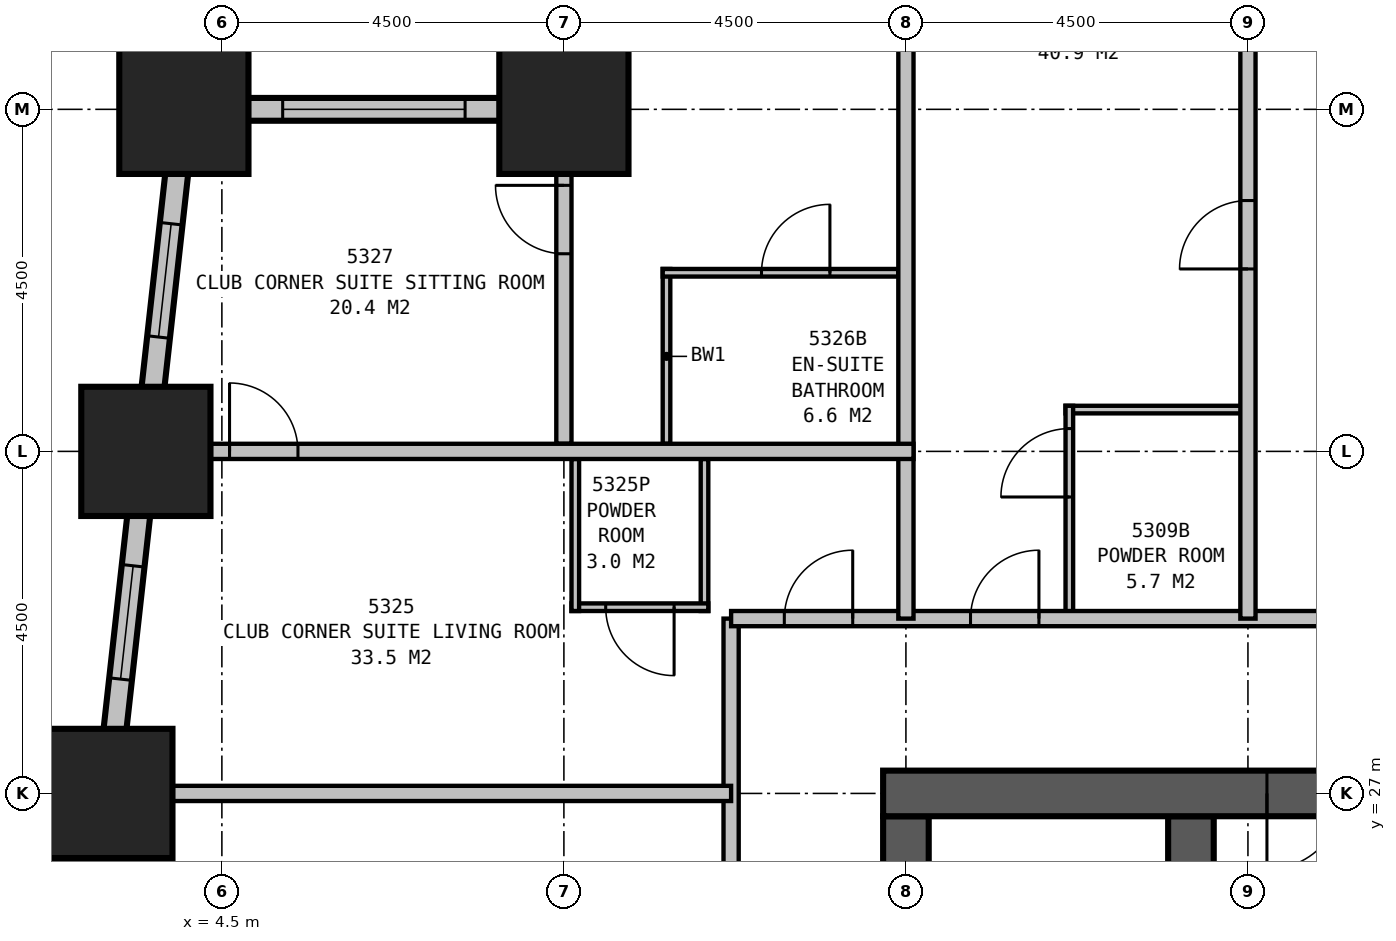
"""IFC4 building model, lengths in metres.
Left out: names, types, materials, properties, quantities, classifications, styles, units other than length and angle.
Written with IfcOpenShell. Run it as: python <this file> out.ifc"""

import sys

from ifc_helpers import new_model, si_unit, direction, frame, frame_2d, origin, origin_2d, place, context, subcontext, project, spatial, rectangle, extrude, element, fill, save


model = new_model("IFC4")
c1 = context("Model", 3, precision=1e-05, world=origin(), true_north=direction((0.0, 1.0)))
c2 = subcontext(c1, "Body", "Model", "MODEL_VIEW")
j1 = project(units=[si_unit("LENGTHUNIT", "METRE"), si_unit("PLANEANGLEUNIT", "RADIAN")], contexts=[c1])
p1 = place(None, origin())
s1 = spatial("IfcSite", under=j1, at=p1, CompositionType="ELEMENT")
p2 = place(p1, origin())
s2 = spatial("IfcBuilding", under=s1, at=p2, CompositionType="ELEMENT")
p3 = place(p2, frame((0.0, 0.0, 204.4)))
s3 = spatial("IfcBuildingStorey", under=s2, at=p3, CompositionType="ELEMENT", Elevation=204.4)
for number, where, z_axis, x_axis in (
    (1, (9.0, 36.0, 0.0), (0.0, 0.0, 1.0), (1.0, 0.0, 0.0)),
    (2, (4.0, 36.0, 0.0), (0.0, 0.0, 1.0), (1.0, 0.0, 0.0)),
    (3, (3.5, 31.5, 0.0), (0.0, 0.0, 1.0), (1.0, 0.0, 0.0)),
    (4, (3.0, 27.0, 0.0), (0.0, 0.0, 1.0), (1.0, 0.0, 0.0)),
):
    element("IfcColumn", number, at=place(p3, frame(where, z_axis=z_axis, x_axis=x_axis)), inside=s3, PredefinedType="COLUMN", context=c2, shape_type="SweptSolid", body=[
        extrude(rectangle(XDim=1.7, YDim=1.7, at=origin_2d()), origin(), (0.0, 0.0, 1.0), 3.5),
    ])
p4 = place(p3, frame((36.3, 27.0, 0.0), z_axis=(0.0, 0.0, 1.0), x_axis=(-1.0, 0.0, 0.0)))
e5 = element("IfcWall", 5, at=p4, inside=s3, PredefinedType="SHEAR", context=c2, shape_type="SweptSolid", body=[
    extrude(rectangle(XDim=23.1, YDim=0.6, at=frame_2d((11.55, 0.0))), origin(), (0.0, 0.0, 1.0), 3.5),
])
p5 = place(p4, frame((17.05, 0.0, 0.0)))
e6 = element("IfcOpeningElement", 6, at=p5, cuts=e5, PredefinedType="OPENING", context=c2, shape_type="SweptSolid", body=[
    extrude(rectangle(XDim=1.0, YDim=2.1, at=frame_2d((0.5, 1.05))), frame((0.0, 0.31, 0.0), z_axis=(0.0, -1.0, 0.0), x_axis=(1.0, 0.0, 0.0)), (0.0, 0.0, 1.0), 0.62),
])
p6 = place(p4, frame((12.05, 0.0, 0.0)))
e7 = element("IfcOpeningElement", 7, at=p6, cuts=e5, PredefinedType="OPENING", context=c2, shape_type="SweptSolid", body=[
    extrude(rectangle(XDim=1.0, YDim=2.1, at=frame_2d((0.5, 1.05))), frame((0.0, 0.31, 0.0), z_axis=(0.0, -1.0, 0.0), x_axis=(1.0, 0.0, 0.0)), (0.0, 0.0, 1.0), 0.62),
])
p7 = place(p4, frame((7.05, 0.0, 0.0)))
e8 = element("IfcOpeningElement", 8, at=p7, cuts=e5, PredefinedType="OPENING", context=c2, shape_type="SweptSolid", body=[
    extrude(rectangle(XDim=1.0, YDim=2.1, at=frame_2d((0.5, 1.05))), frame((0.0, 0.31, 0.0), z_axis=(0.0, -1.0, 0.0), x_axis=(1.0, 0.0, 0.0)), (0.0, 0.0, 1.0), 0.62),
])
p8 = place(p3, frame((17.25, 13.8, 0.0), z_axis=(0.0, 0.0, 1.0), x_axis=(0.0, 1.0, 0.0)))
e9 = element("IfcWall", 9, at=p8, inside=s3, PredefinedType="SHEAR", context=c2, shape_type="SweptSolid", body=[
    extrude(rectangle(XDim=12.9, YDim=0.6, at=frame_2d((6.45, 0.0))), origin(), (0.0, 0.0, 1.0), 3.5),
])
p9 = place(p8, frame((3.85, 0.0, 0.0)))
e10 = element("IfcOpeningElement", 10, at=p9, cuts=e9, PredefinedType="OPENING", context=c2, shape_type="SweptSolid", body=[
    extrude(rectangle(XDim=1.2, YDim=2.1, at=frame_2d((0.6, 1.05))), frame((0.0, 0.31, 0.0), z_axis=(0.0, -1.0, 0.0), x_axis=(1.0, 0.0, 0.0)), (0.0, 0.0, 1.0), 0.62),
])
p10 = place(p3, frame((13.5, 26.7, 0.0), z_axis=(0.0, 0.0, 1.0), x_axis=(0.0, -1.0, 0.0)))
e11 = element("IfcWall", 11, at=p10, inside=s3, PredefinedType="SHEAR", context=c2, shape_type="SweptSolid", body=[
    extrude(rectangle(XDim=6.7, YDim=0.6, at=frame_2d((3.35, 0.0))), origin(), (0.0, 0.0, 1.0), 3.5),
])
p11 = place(p3, frame((9.0, 40.65, 0.0), z_axis=(0.0, 0.0, 1.0), x_axis=(0.0, -1.0, 0.0)))
e12 = element("IfcWall", 12, at=p11, inside=s3, PredefinedType="STANDARD", context=c2, shape_type="SweptSolid", body=[
    extrude(rectangle(XDim=4.8, YDim=0.3, at=frame_2d((2.4, 0.0))), origin(), (0.0, 0.0, 1.0), 2.25),
])
p12 = place(p11, frame((1.2, 0.0, 0.5)))
e13 = element("IfcOpeningElement", 13, at=p12, cuts=e12, PredefinedType="OPENING", context=c2, shape_type="SweptSolid", body=[
    extrude(rectangle(XDim=2.4, YDim=1.6, at=frame_2d((1.2, 0.8))), frame((0.0, 0.16, 0.0), z_axis=(0.0, -1.0, 0.0), x_axis=(1.0, 0.0, 0.0)), (0.0, 0.0, 1.0), 0.32),
])
p13 = place(p3, frame((9.15, 36.0, 0.0), z_axis=(0.0, 0.0, 1.0), x_axis=(-1.0, 0.0, 0.0)))
e14 = element("IfcWall", 14, at=p13, inside=s3, PredefinedType="STANDARD", context=c2, shape_type="SweptSolid", body=[
    extrude(rectangle(XDim=5.3, YDim=0.3, at=frame_2d((2.65, 0.0))), origin(), (0.0, 0.0, 1.0), 2.25),
])
p14 = place(p13, frame((1.45, 0.0, 0.5)))
e15 = element("IfcOpeningElement", 15, at=p14, cuts=e14, PredefinedType="OPENING", context=c2, shape_type="SweptSolid", body=[
    extrude(rectangle(XDim=2.4, YDim=1.6, at=frame_2d((1.2, 0.8))), frame((0.0, 0.16, 0.0), z_axis=(0.0, -1.0, 0.0), x_axis=(1.0, 0.0, 0.0)), (0.0, 0.0, 1.0), 0.32),
])
p15 = place(p3, frame((4.017, 36.149, 0.0), z_axis=(0.0, 0.0, 1.0), x_axis=(-0.110433862387, -0.993883475081, 0.0)))
e16 = element("IfcWall", 16, at=p15, inside=s3, PredefinedType="STANDARD", context=c2, shape_type="SweptSolid", body=[
    extrude(rectangle(XDim=22.939, YDim=0.3, at=frame_2d((11.469, 0.0))), origin(), (0.0, 0.0, 1.0), 2.25),
])
p16 = place(p15, frame((1.664, 0.0, 0.5)))
e17 = element("IfcOpeningElement", 17, at=p16, cuts=e16, PredefinedType="OPENING", context=c2, shape_type="SweptSolid", body=[
    extrude(rectangle(XDim=1.5, YDim=1.6, at=frame_2d((0.75, 0.8))), frame((0.0, 0.16, 0.0), z_axis=(0.0, -1.0, 0.0), x_axis=(1.0, 0.0, 0.0)), (0.0, 0.0, 1.0), 0.32),
])
p17 = place(p15, frame((6.192, 0.0, 0.5)))
e18 = element("IfcOpeningElement", 18, at=p17, cuts=e16, PredefinedType="OPENING", context=c2, shape_type="SweptSolid", body=[
    extrude(rectangle(XDim=1.5, YDim=1.6, at=frame_2d((0.75, 0.8))), frame((0.0, 0.16, 0.0), z_axis=(0.0, -1.0, 0.0), x_axis=(1.0, 0.0, 0.0)), (0.0, 0.0, 1.0), 0.32),
])
p18 = place(p15, frame((10.719, 0.0, 0.5)))
e19 = element("IfcOpeningElement", 19, at=p18, cuts=e16, PredefinedType="OPENING", context=c2, shape_type="SweptSolid", body=[
    extrude(rectangle(XDim=1.5, YDim=1.6, at=frame_2d((0.75, 0.8))), frame((0.0, 0.16, 0.0), z_axis=(0.0, -1.0, 0.0), x_axis=(1.0, 0.0, 0.0)), (0.0, 0.0, 1.0), 0.32),
])
p19 = place(p15, frame((15.247, 0.0, 0.5)))
e20 = element("IfcOpeningElement", 20, at=p19, cuts=e16, PredefinedType="OPENING", context=c2, shape_type="SweptSolid", body=[
    extrude(rectangle(XDim=1.5, YDim=1.6, at=frame_2d((0.75, 0.8))), frame((0.0, 0.16, 0.0), z_axis=(0.0, -1.0, 0.0), x_axis=(1.0, 0.0, 0.0)), (0.0, 0.0, 1.0), 0.32),
])
p20 = place(p15, frame((19.775, 0.0, 0.5)))
e21 = element("IfcOpeningElement", 21, at=p20, cuts=e16, PredefinedType="OPENING", context=c2, shape_type="SweptSolid", body=[
    extrude(rectangle(XDim=1.5, YDim=1.6, at=frame_2d((0.75, 0.8))), frame((0.0, 0.16, 0.0), z_axis=(0.0, -1.0, 0.0), x_axis=(1.0, 0.0, 0.0)), (0.0, 0.0, 1.0), 0.32),
])
p21 = place(p3, frame((11.2, 29.3, 0.0), z_axis=(0.0, 0.0, 1.0), x_axis=(1.0, 0.0, 0.0)))
e22 = element("IfcWall", 22, at=p21, inside=s3, PredefinedType="PARTITIONING", context=c2, shape_type="SweptSolid", body=[
    extrude(rectangle(XDim=27.1, YDim=0.2, at=frame_2d((13.55, 0.0))), origin(), (0.0, 0.0, 1.0), 3.25),
])
p22 = place(p21, frame((3.15, 0.0, 0.0)))
e23 = element("IfcOpeningElement", 23, at=p22, cuts=e22, PredefinedType="OPENING", context=c2, shape_type="SweptSolid", body=[
    extrude(rectangle(XDim=0.9, YDim=2.1, at=frame_2d((0.45, 1.05))), frame((0.0, 0.11, 0.0), z_axis=(0.0, -1.0, 0.0), x_axis=(1.0, 0.0, 0.0)), (0.0, 0.0, 1.0), 0.22),
])
p23 = place(p21, frame((16.65, 0.0, 0.0)))
e24 = element("IfcOpeningElement", 24, at=p23, cuts=e22, PredefinedType="OPENING", context=c2, shape_type="SweptSolid", body=[
    extrude(rectangle(XDim=0.9, YDim=2.1, at=frame_2d((0.45, 1.05))), frame((0.0, 0.11, 0.0), z_axis=(0.0, -1.0, 0.0), x_axis=(1.0, 0.0, 0.0)), (0.0, 0.0, 1.0), 0.22),
])
p24 = place(p21, frame((25.5, 0.0, 0.0)))
e25 = element("IfcOpeningElement", 25, at=p24, cuts=e22, PredefinedType="OPENING", context=c2, shape_type="SweptSolid", body=[
    extrude(rectangle(XDim=0.9, YDim=2.1, at=frame_2d((0.45, 1.05))), frame((0.0, 0.11, 0.0), z_axis=(0.0, -1.0, 0.0), x_axis=(1.0, 0.0, 0.0)), (0.0, 0.0, 1.0), 0.22),
])
p25 = place(p21, frame((0.7, 0.0, 0.0)))
e26 = element("IfcOpeningElement", 26, at=p25, cuts=e22, PredefinedType="OPENING", context=c2, shape_type="SweptSolid", body=[
    extrude(rectangle(XDim=0.9, YDim=2.1, at=frame_2d((0.45, 1.05))), frame((0.0, 0.11, 0.0), z_axis=(0.0, -1.0, 0.0), x_axis=(1.0, 0.0, 0.0)), (0.0, 0.0, 1.0), 0.22),
])
p26 = place(p3, frame((11.2, 10.6, 0.0), z_axis=(0.0, 0.0, 1.0), x_axis=(0.0, 1.0, 0.0)))
e27 = element("IfcWall", 27, at=p26, inside=s3, PredefinedType="PARTITIONING", context=c2, shape_type="SweptSolid", body=[
    extrude(rectangle(XDim=18.7, YDim=0.2, at=frame_2d((9.35, 0.0))), origin(), (0.0, 0.0, 1.0), 3.25),
])
p27 = place(p26, frame((4.9, 0.0, 0.0)))
e28 = element("IfcOpeningElement", 28, at=p27, cuts=e27, PredefinedType="OPENING", context=c2, shape_type="SweptSolid", body=[
    extrude(rectangle(XDim=1.0, YDim=2.1, at=frame_2d((0.5, 1.05))), frame((0.0, 0.11, 0.0), z_axis=(0.0, -1.0, 0.0), x_axis=(1.0, 0.0, 0.0)), (0.0, 0.0, 1.0), 0.22),
])
p28 = place(p26, frame((9.35, 0.0, 0.0)))
e29 = element("IfcOpeningElement", 29, at=p28, cuts=e27, PredefinedType="OPENING", context=c2, shape_type="SweptSolid", body=[
    extrude(rectangle(XDim=0.9, YDim=2.1, at=frame_2d((0.45, 1.05))), frame((0.0, 0.11, 0.0), z_axis=(0.0, -1.0, 0.0), x_axis=(1.0, 0.0, 0.0)), (0.0, 0.0, 1.0), 0.22),
])
p29 = place(p3, frame((18.0, 29.3, 0.0), z_axis=(0.0, 0.0, 1.0), x_axis=(0.0, 1.0, 0.0)))
e30 = element("IfcWall", 30, at=p29, inside=s3, PredefinedType="PARTITIONING", context=c2, shape_type="SweptSolid", body=[
    extrude(rectangle(XDim=11.2, YDim=0.2, at=frame_2d((5.6, 0.0))), origin(), (0.0, 0.0, 1.0), 2.25),
])
p30 = place(p29, frame((4.6, 0.0, 0.0)))
e31 = element("IfcOpeningElement", 31, at=p30, cuts=e30, PredefinedType="OPENING", context=c2, shape_type="SweptSolid", body=[
    extrude(rectangle(XDim=0.9, YDim=2.1, at=frame_2d((0.45, 1.05))), frame((0.0, 0.11, 0.0), z_axis=(0.0, -1.0, 0.0), x_axis=(1.0, 0.0, 0.0)), (0.0, 0.0, 1.0), 0.22),
])
p31 = place(p3, frame((15.6, 32.05, 0.0), z_axis=(0.0, 0.0, 1.0), x_axis=(1.0, 0.0, 0.0)))
e32 = element("IfcWall", 32, at=p31, inside=s3, PredefinedType="PLUMBINGWALL", context=c2, shape_type="SweptSolid", body=[
    extrude(rectangle(XDim=2.4, YDim=0.1, at=frame_2d((1.2, 0.0))), origin(), (0.0, 0.0, 1.0), 3.25),
])
p32 = place(p3, frame((15.65, 29.3, 0.0), z_axis=(0.0, 0.0, 1.0), x_axis=(0.0, 1.0, 0.0)))
e33 = element("IfcWall", 33, at=p32, inside=s3, PredefinedType="PLUMBINGWALL", context=c2, shape_type="SweptSolid", body=[
    extrude(rectangle(XDim=2.8, YDim=0.1, at=frame_2d((1.4, 0.0))), origin(), (0.0, 0.0, 1.0), 3.25),
])
p33 = place(p32, frame((1.6, 0.0, 0.0)))
e34 = element("IfcOpeningElement", 34, at=p33, cuts=e33, PredefinedType="OPENING", context=c2, shape_type="SweptSolid", body=[
    extrude(rectangle(XDim=0.9, YDim=2.1, at=frame_2d((0.45, 1.05))), frame((0.0, 0.06, 0.0), z_axis=(0.0, -1.0, 0.0), x_axis=(1.0, 0.0, 0.0)), (0.0, 0.0, 1.0), 0.12),
])
p34 = place(p3, frame((11.2, 27.0, 0.0), z_axis=(0.0, 0.0, 1.0), x_axis=(-1.0, 0.0, 0.0)))
e35 = element("IfcWall", 35, at=p34, inside=s3, PredefinedType="PARTITIONING", context=c2, shape_type="SweptSolid", body=[
    extrude(rectangle(XDim=7.977, YDim=0.2, at=frame_2d((3.988, 0.0))), origin(), (0.0, 0.0, 1.0), 1.95),
])
p35 = place(p3, frame((13.5, 29.3, 0.0), z_axis=(0.0, 0.0, 1.0), x_axis=(0.0, 1.0, 0.0)))
e36 = element("IfcWall", 36, at=p35, inside=s3, PredefinedType="PARTITIONING", context=c2, shape_type="SweptSolid", body=[
    extrude(rectangle(XDim=11.2, YDim=0.2, at=frame_2d((5.6, 0.0))), origin(), (0.0, 0.0, 1.0), 2.25),
])
p36 = place(p3, frame((13.6, 31.5, 0.0), z_axis=(0.0, 0.0, 1.0), x_axis=(-1.0, 0.0, 0.0)))
e37 = element("IfcWall", 37, at=p36, inside=s3, PredefinedType="PARTITIONING", context=c2, shape_type="SweptSolid", body=[
    extrude(rectangle(XDim=10.099, YDim=0.2, at=frame_2d((5.05, 0.0))), origin(), (0.0, 0.0, 1.0), 3.25),
])
p37 = place(p36, frame((8.999, 0.0, 0.0), z_axis=(0.0, 0.0, 1.0), x_axis=(-1.0, 0.0, 0.0)))
e38 = element("IfcOpeningElement", 38, at=p37, cuts=e37, PredefinedType="OPENING", context=c2, shape_type="SweptSolid", body=[
    extrude(rectangle(XDim=0.9, YDim=2.1, at=frame_2d((0.45, 1.05))), frame((0.0, 0.11, 0.0), z_axis=(0.0, -1.0, 0.0), x_axis=(1.0, 0.0, 0.0)), (0.0, 0.0, 1.0), 0.22),
])
p38 = place(p3, frame((9.15, 31.4, 0.0), z_axis=(0.0, 0.0, 1.0), x_axis=(0.0, -1.0, 0.0)))
e39 = element("IfcWall", 39, at=p38, inside=s3, PredefinedType="PLUMBINGWALL", context=c2, shape_type="SweptSolid", body=[
    extrude(rectangle(XDim=2.0, YDim=0.1, at=frame_2d((1.0, 0.0))), origin(), (0.0, 0.0, 1.0), 2.25),
])
p39 = place(p3, frame((10.85, 31.4, 0.0), z_axis=(0.0, 0.0, 1.0), x_axis=(0.0, -1.0, 0.0)))
e40 = element("IfcWall", 40, at=p39, inside=s3, PredefinedType="PLUMBINGWALL", context=c2, shape_type="SweptSolid", body=[
    extrude(rectangle(XDim=2.0, YDim=0.1, at=frame_2d((1.0, 0.0))), origin(), (0.0, 0.0, 1.0), 3.25),
])
p40 = place(p3, frame((10.9, 29.45, 0.0), z_axis=(0.0, 0.0, 1.0), x_axis=(-1.0, 0.0, 0.0)))
e41 = element("IfcWall", 41, at=p40, inside=s3, PredefinedType="PLUMBINGWALL", context=c2, shape_type="SweptSolid", body=[
    extrude(rectangle(XDim=1.8, YDim=0.1, at=frame_2d((0.9, 0.0))), origin(), (0.0, 0.0, 1.0), 3.25),
])
p41 = place(p40, frame((0.45, 0.0, 0.0)))
e42 = element("IfcOpeningElement", 42, at=p41, cuts=e41, PredefinedType="OPENING", context=c2, shape_type="SweptSolid", body=[
    extrude(rectangle(XDim=0.9, YDim=2.1, at=frame_2d((0.45, 1.05))), frame((0.0, 0.06, 0.0), z_axis=(0.0, -1.0, 0.0), x_axis=(1.0, 0.0, 0.0)), (0.0, 0.0, 1.0), 0.12),
])
p42 = place(p3, frame((9.0, 31.6, 0.0), z_axis=(0.0, 0.0, 1.0), x_axis=(0.0, 1.0, 0.0)))
e43 = element("IfcWall", 43, at=p42, inside=s3, PredefinedType="PARTITIONING", context=c2, shape_type="SweptSolid", body=[
    extrude(rectangle(XDim=4.4, YDim=0.2, at=frame_2d((2.2, 0.0))), origin(), (0.0, 0.0, 1.0), 2.25),
])
p43 = place(p42, frame((2.5, 0.0, 0.0)))
e44 = element("IfcOpeningElement", 44, at=p43, cuts=e43, PredefinedType="OPENING", context=c2, shape_type="SweptSolid", body=[
    extrude(rectangle(XDim=0.9, YDim=2.1, at=frame_2d((0.45, 1.05))), frame((0.0, 0.11, 0.0), z_axis=(0.0, -1.0, 0.0), x_axis=(1.0, 0.0, 0.0)), (0.0, 0.0, 1.0), 0.22),
])
p44 = place(p3, frame((10.35, 31.6, 0.0), z_axis=(0.0, 0.0, 1.0), x_axis=(0.0, 1.0, 0.0)))
e45 = element("IfcWall", 45, at=p44, inside=s3, PredefinedType="PLUMBINGWALL", context=c2, shape_type="SweptSolid", body=[
    extrude(rectangle(XDim=2.3, YDim=0.1, at=frame_2d((1.15, 0.0))), origin(), (0.0, 0.0, 1.0), 3.25),
])
p45 = place(p3, frame((13.4, 33.85, 0.0), z_axis=(0.0, 0.0, 1.0), x_axis=(-1.0, 0.0, 0.0)))
e46 = element("IfcWall", 46, at=p45, inside=s3, PredefinedType="PLUMBINGWALL", context=c2, shape_type="SweptSolid", body=[
    extrude(rectangle(XDim=3.1, YDim=0.1, at=frame_2d((1.55, 0.0))), origin(), (0.0, 0.0, 1.0), 3.25),
])
p46 = place(p45, frame((1.8, 0.0, 0.0), z_axis=(0.0, 0.0, 1.0), x_axis=(-1.0, 0.0, 0.0)))
e47 = element("IfcOpeningElement", 47, at=p46, cuts=e46, PredefinedType="OPENING", context=c2, shape_type="SweptSolid", body=[
    extrude(rectangle(XDim=0.9, YDim=2.1, at=frame_2d((0.45, 1.05))), frame((0.0, 0.06, 0.0), z_axis=(0.0, -1.0, 0.0), x_axis=(1.0, 0.0, 0.0)), (0.0, 0.0, 1.0), 0.12),
])
p47 = place(p14, origin())
e48 = element("IfcWindow", 48, at=p47, inside=s3, PartitioningType="SINGLE_PANEL", PredefinedType="WINDOW", context=c2, shape_type="SweptSolid", body=[
    extrude(rectangle(XDim=2.4, YDim=1.6, at=frame_2d((1.2, 0.8))), frame((0.0, 0.03, 0.0), z_axis=(0.0, -1.0, 0.0), x_axis=(1.0, 0.0, 0.0)), (0.0, 0.0, 1.0), 0.06),
])
fill(e15, e48)
p48 = place(p16, origin())
e49 = element("IfcWindow", 49, at=p48, inside=s3, PartitioningType="SINGLE_PANEL", PredefinedType="WINDOW", context=c2, shape_type="SweptSolid", body=[
    extrude(rectangle(XDim=1.5, YDim=1.6, at=frame_2d((0.75, 0.8))), frame((0.0, 0.03, 0.0), z_axis=(0.0, -1.0, 0.0), x_axis=(1.0, 0.0, 0.0)), (0.0, 0.0, 1.0), 0.06),
])
fill(e17, e49)
p49 = place(p17, origin())
e50 = element("IfcWindow", 50, at=p49, inside=s3, PartitioningType="SINGLE_PANEL", PredefinedType="WINDOW", context=c2, shape_type="SweptSolid", body=[
    extrude(rectangle(XDim=1.5, YDim=1.6, at=frame_2d((0.75, 0.8))), frame((0.0, 0.03, 0.0), z_axis=(0.0, -1.0, 0.0), x_axis=(1.0, 0.0, 0.0)), (0.0, 0.0, 1.0), 0.06),
])
fill(e18, e50)
p50 = place(p22, origin())
e51 = element("IfcDoor", 51, at=p50, inside=s3, OperationType="SINGLE_SWING_RIGHT", PredefinedType="DOOR", context=c2, shape_type="SweptSolid", body=[
    extrude(rectangle(XDim=0.9, YDim=2.1, at=frame_2d((0.45, 1.05))), frame((0.0, 0.025, 0.0), z_axis=(0.0, -1.0, 0.0), x_axis=(1.0, 0.0, 0.0)), (0.0, 0.0, 1.0), 0.05),
])
fill(e23, e51)
p51 = place(p25, origin())
e52 = element("IfcDoor", 52, at=p51, inside=s3, OperationType="SINGLE_SWING_RIGHT", PredefinedType="DOOR", context=c2, shape_type="SweptSolid", body=[
    extrude(rectangle(XDim=0.9, YDim=2.1, at=frame_2d((0.45, 1.05))), frame((0.0, 0.025, 0.0), z_axis=(0.0, -1.0, 0.0), x_axis=(1.0, 0.0, 0.0)), (0.0, 0.0, 1.0), 0.05),
])
fill(e26, e52)
p52 = place(p30, origin())
e53 = element("IfcDoor", 53, at=p52, inside=s3, OperationType="SINGLE_SWING_LEFT", PredefinedType="DOOR", context=c2, shape_type="SweptSolid", body=[
    extrude(rectangle(XDim=0.9, YDim=2.1, at=frame_2d((0.45, 1.05))), frame((0.0, 0.025, 0.0), z_axis=(0.0, -1.0, 0.0), x_axis=(1.0, 0.0, 0.0)), (0.0, 0.0, 1.0), 0.05),
])
fill(e31, e53)
p53 = place(p33, origin())
e54 = element("IfcDoor", 54, at=p53, inside=s3, OperationType="SINGLE_SWING_LEFT", PredefinedType="DOOR", context=c2, shape_type="SweptSolid", body=[
    extrude(rectangle(XDim=0.9, YDim=2.1, at=frame_2d((0.45, 1.05))), frame((0.0, 0.025, 0.0), z_axis=(0.0, -1.0, 0.0), x_axis=(1.0, 0.0, 0.0)), (0.0, 0.0, 1.0), 0.05),
])
fill(e34, e54)
p54 = place(p37, origin())
e55 = element("IfcDoor", 55, at=p54, inside=s3, OperationType="SINGLE_SWING_LEFT", PredefinedType="DOOR", context=c2, shape_type="SweptSolid", body=[
    extrude(rectangle(XDim=0.9, YDim=2.1, at=frame_2d((0.45, 1.05))), frame((0.0, 0.025, 0.0), z_axis=(0.0, -1.0, 0.0), x_axis=(1.0, 0.0, 0.0)), (0.0, 0.0, 1.0), 0.05),
])
fill(e38, e55)
p55 = place(p41, origin())
e56 = element("IfcDoor", 56, at=p55, inside=s3, OperationType="SINGLE_SWING_LEFT", PredefinedType="DOOR", context=c2, shape_type="SweptSolid", body=[
    extrude(rectangle(XDim=0.9, YDim=2.1, at=frame_2d((0.45, 1.05))), frame((0.0, 0.025, 0.0), z_axis=(0.0, -1.0, 0.0), x_axis=(1.0, 0.0, 0.0)), (0.0, 0.0, 1.0), 0.05),
])
fill(e42, e56)
p56 = place(p43, origin())
e57 = element("IfcDoor", 57, at=p56, inside=s3, OperationType="SINGLE_SWING_RIGHT", PredefinedType="DOOR", context=c2, shape_type="SweptSolid", body=[
    extrude(rectangle(XDim=0.9, YDim=2.1, at=frame_2d((0.45, 1.05))), frame((0.0, 0.025, 0.0), z_axis=(0.0, -1.0, 0.0), x_axis=(1.0, 0.0, 0.0)), (0.0, 0.0, 1.0), 0.05),
])
fill(e44, e57)
p57 = place(p46, origin())
e58 = element("IfcDoor", 58, at=p57, inside=s3, OperationType="SINGLE_SWING_RIGHT", PredefinedType="DOOR", context=c2, shape_type="SweptSolid", body=[
    extrude(rectangle(XDim=0.9, YDim=2.1, at=frame_2d((0.45, 1.05))), frame((0.0, 0.025, 0.0), z_axis=(0.0, -1.0, 0.0), x_axis=(1.0, 0.0, 0.0)), (0.0, 0.0, 1.0), 0.05),
])
fill(e47, e58)
p58 = place(p5, origin())
e59 = element("IfcDoor", 59, at=p58, inside=s3, OperationType="SINGLE_SWING_RIGHT", PredefinedType="DOOR", context=c2, shape_type="SweptSolid", body=[
    extrude(rectangle(XDim=1.0, YDim=2.1, at=frame_2d((0.5, 1.05))), frame((0.0, 0.3, 0.0), z_axis=(0.0, -1.0, 0.0), x_axis=(1.0, 0.0, 0.0)), (0.0, 0.0, 1.0), 0.6),
])
fill(e6, e59)
save(model, sys.argv[1])
